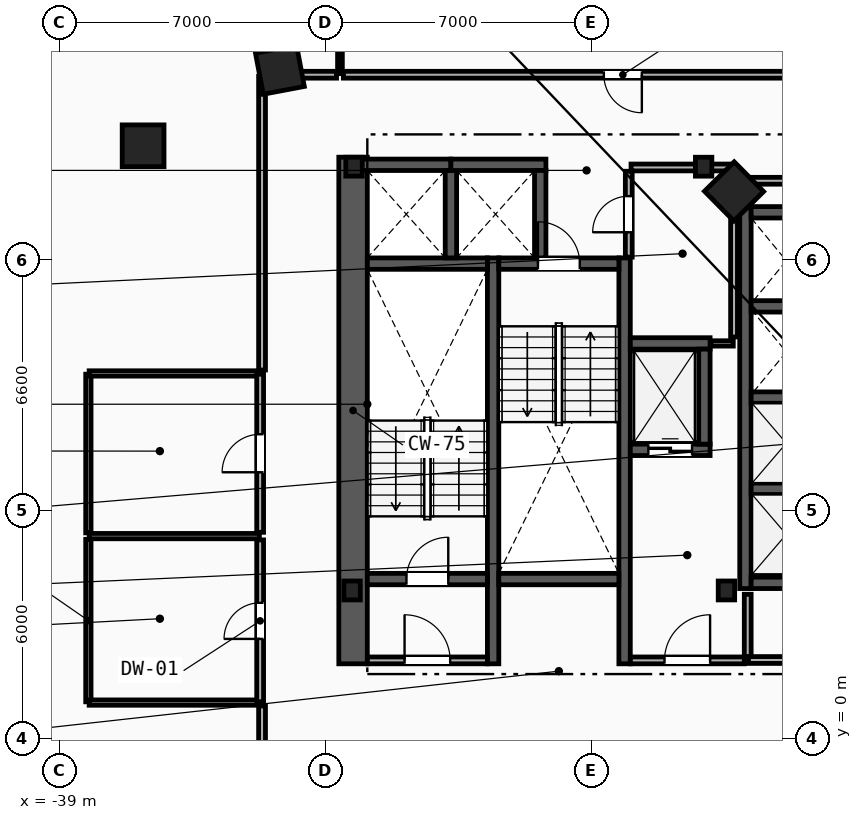
"""IFC4 building model, lengths in metres.
Left out: names, types, materials, properties, quantities, classifications, styles, units other than length and angle.
Written with IfcOpenShell. Run it as: python <this file> out.ifc"""

import sys

from ifc_helpers import new_model, si_unit, direction, frame, frame_2d, origin, origin_2d, place, context, subcontext, project, spatial, rectangle, i_section, extrude, element, fill, save


model = new_model("IFC4")
c1 = context("Model", 3, precision=1e-05, world=origin(), true_north=direction((0.0, 1.0)))
c2 = subcontext(c1, "Body", "Model", "MODEL_VIEW")
j1 = project(units=[si_unit("LENGTHUNIT", "METRE"), si_unit("PLANEANGLEUNIT", "RADIAN")], contexts=[c1])
p1 = place(None, origin())
s1 = spatial("IfcSite", under=j1, at=p1, CompositionType="ELEMENT")
p2 = place(p1, origin())
s2 = spatial("IfcBuilding", under=s1, at=p2, CompositionType="ELEMENT")
p3 = place(p2, frame((0.0, 0.0, 128.6)))
s3 = spatial("IfcBuildingStorey", under=s2, at=p3, CompositionType="ELEMENT", Elevation=128.6)
for number, where, z_axis, x_axis in (
    (1, (-31.3, 3.9, 0.0), (0.0, 0.0, 1.0), (1.0, 0.0, 0.0)),
    (2, (-21.45, 3.9, 0.0), (0.0, 0.0, 1.0), (1.0, 0.0, 0.0)),
    (3, (-22.05, 15.05, 0.0), (0.0, 0.0, 1.0), (1.0, 0.0, 0.0)),
    (4, (-31.25, 15.05, 0.0), (0.0, 0.0, 1.0), (1.0, 0.0, 0.0)),
):
    element("IfcColumn", number, at=place(p3, frame(where, z_axis=z_axis, x_axis=x_axis)), inside=s3, PredefinedType="COLUMN", context=c2, shape_type="SweptSolid", body=[
        extrude(i_section(OverallWidth=0.432, OverallDepth=0.498, WebThickness=0.056, FlangeThickness=0.089, FilletRadius=0.018, at=origin_2d()), origin(), (0.0, 0.0, 1.0), 3.6),
    ])
for number, where, z_axis, x_axis in (
    (5, (-36.8, 15.6, 0.0), (0.0, 0.0, 1.0), (1.0, 0.0, 0.0)),
    (6, (-21.25, 14.4, 0.0), (0.0, 0.0, 1.0), (-0.703, 0.711, 0.0)),
    (7, (-33.2, 17.6, 0.0), (0.0, 0.0, 1.0), (-0.983, -0.186, 0.0)),
):
    element("IfcColumn", number, at=place(p3, frame(where, z_axis=z_axis, x_axis=x_axis)), inside=s3, PredefinedType="COLUMN", context=c2, shape_type="SweptSolid", body=[
        extrude(rectangle(XDim=1.1, YDim=1.1, at=origin_2d()), origin(), (0.0, 0.0, 1.0), 3.6),
    ])
p4 = place(p3, frame((-31.275, 1.97, 0.0), z_axis=(0.0, 0.0, 1.0), x_axis=(0.0, 1.0, 0.0)))
e8 = element("IfcWall", 8, at=p4, inside=s3, PredefinedType="SHEAR", context=c2, shape_type="SweptSolid", body=[
    extrude(rectangle(XDim=13.33, YDim=0.75, at=frame_2d((6.665, 0.0))), origin(), (0.0, 0.0, 1.0), 3.32),
])
for number, where, z_axis, x_axis in (
    (9, (-27.59, 1.97, 0.0), (0.0, 0.0, 1.0), (0.0, 1.0, 0.0)),
    (10, (-24.13, 1.97, 0.0), (0.0, 0.0, 1.0), (0.0, 1.0, 0.0)),
):
    element("IfcWall", number, at=place(p3, frame(where, z_axis=z_axis, x_axis=x_axis)), inside=s3, PredefinedType="SHEAR", context=c2, shape_type="SweptSolid", body=[
        extrude(rectangle(XDim=10.68, YDim=0.3, at=frame_2d((5.34, 0.0))), origin(), (0.0, 0.0, 1.0), 3.32),
    ])
p5 = place(p3, frame((-30.9, 4.2, 0.0), z_axis=(0.0, 0.0, 1.0), x_axis=(1.0, 0.0, 0.0)))
e11 = element("IfcWall", 11, at=p5, inside=s3, PredefinedType="SHEAR", context=c2, shape_type="SweptSolid", body=[
    extrude(rectangle(XDim=3.16, YDim=0.3, at=frame_2d((1.58, 0.0))), origin(), (0.0, 0.0, 1.0), 3.32),
])
p6 = place(p5, frame((1.03, 0.0, 0.0)))
e12 = element("IfcOpeningElement", 12, at=p6, cuts=e11, PredefinedType="OPENING", context=c2, shape_type="SweptSolid", body=[
    extrude(rectangle(XDim=1.1, YDim=2.15, at=frame_2d((0.55, 1.075))), frame((0.0, 0.16, 0.0), z_axis=(0.0, -1.0, 0.0), x_axis=(1.0, 0.0, 0.0)), (0.0, 0.0, 1.0), 0.32),
])
p7 = place(p3, frame((-30.9, 12.5, 0.0), z_axis=(0.0, 0.0, 1.0), x_axis=(1.0, 0.0, 0.0)))
e13 = element("IfcWall", 13, at=p7, inside=s3, PredefinedType="SHEAR", context=c2, shape_type="SweptSolid", body=[
    extrude(rectangle(XDim=3.16, YDim=0.3, at=frame_2d((1.58, 0.0))), origin(), (0.0, 0.0, 1.0), 3.32),
])
p8 = place(p3, frame((-27.44, 12.5, 0.0), z_axis=(0.0, 0.0, 1.0), x_axis=(1.0, 0.0, 0.0)))
e14 = element("IfcWall", 14, at=p8, inside=s3, PredefinedType="SHEAR", context=c2, shape_type="SweptSolid", body=[
    extrude(rectangle(XDim=3.16, YDim=0.3, at=frame_2d((1.58, 0.0))), origin(), (0.0, 0.0, 1.0), 3.32),
])
p9 = place(p8, frame((1.03, 0.0, 0.0)))
e15 = element("IfcOpeningElement", 15, at=p9, cuts=e14, PredefinedType="OPENING", context=c2, shape_type="SweptSolid", body=[
    extrude(rectangle(XDim=1.1, YDim=2.15, at=frame_2d((0.55, 1.075))), frame((0.0, 0.16, 0.0), z_axis=(0.0, -1.0, 0.0), x_axis=(1.0, 0.0, 0.0)), (0.0, 0.0, 1.0), 0.32),
])
p10 = place(p3, frame((-27.44, 4.2, 0.0), z_axis=(0.0, 0.0, 1.0), x_axis=(1.0, 0.0, 0.0)))
e16 = element("IfcWall", 16, at=p10, inside=s3, PredefinedType="SHEAR", context=c2, shape_type="SweptSolid", body=[
    extrude(rectangle(XDim=3.16, YDim=0.3, at=frame_2d((1.58, 0.0))), origin(), (0.0, 0.0, 1.0), 3.32),
])
p11 = place(p3, frame((-20.89, 2.15, 0.0), z_axis=(0.0, 0.0, 1.0), x_axis=(0.0, 1.0, 0.0)))
e17 = element("IfcWall", 17, at=p11, inside=s3, PredefinedType="PARTITIONING", context=c2, shape_type="SweptSolid", body=[
    extrude(rectangle(XDim=1.65, YDim=0.18, at=frame_2d((0.825, 0.0))), origin(), (0.0, 0.0, 1.0), 3.32),
])
p12 = place(p3, frame((-23.98, 2.06, 0.0), z_axis=(0.0, 0.0, 1.0), x_axis=(1.0, 0.0, 0.0)))
e18 = element("IfcWall", 18, at=p12, inside=s3, PredefinedType="PARTITIONING", context=c2, shape_type="SweptSolid", body=[
    extrude(rectangle(XDim=3.0, YDim=0.18, at=frame_2d((1.5, 0.0))), origin(), (0.0, 0.0, 1.0), 3.32),
])
p13 = place(p12, frame((0.9, 0.0, 0.0)))
e19 = element("IfcOpeningElement", 19, at=p13, cuts=e18, PredefinedType="OPENING", context=c2, shape_type="SweptSolid", body=[
    extrude(rectangle(XDim=1.2, YDim=2.15, at=frame_2d((0.6, 1.075))), frame((0.0, 0.1, 0.0), z_axis=(0.0, -1.0, 0.0), x_axis=(1.0, 0.0, 0.0)), (0.0, 0.0, 1.0), 0.2),
])
p14 = place(p3, frame((-30.9, 2.06, 0.0), z_axis=(0.0, 0.0, 1.0), x_axis=(1.0, 0.0, 0.0)))
e20 = element("IfcWall", 20, at=p14, inside=s3, PredefinedType="PARTITIONING", context=c2, shape_type="SweptSolid", body=[
    extrude(rectangle(XDim=3.16, YDim=0.18, at=frame_2d((1.58, 0.0))), origin(), (0.0, 0.0, 1.0), 3.32),
])
p15 = place(p14, frame((0.98, 0.0, 0.0)))
e21 = element("IfcOpeningElement", 21, at=p15, cuts=e20, PredefinedType="OPENING", context=c2, shape_type="SweptSolid", body=[
    extrude(rectangle(XDim=1.2, YDim=2.15, at=frame_2d((0.6, 1.075))), frame((0.0, 0.1, 0.0), z_axis=(0.0, -1.0, 0.0), x_axis=(1.0, 0.0, 0.0)), (0.0, 0.0, 1.0), 0.2),
])
p16 = place(p3, frame((-23.98, 7.6, 0.0), z_axis=(0.0, 0.0, 1.0), x_axis=(1.0, 0.0, 0.0)))
e22 = element("IfcWall", 22, at=p16, inside=s3, PredefinedType="SHEAR", context=c2, shape_type="SweptSolid", body=[
    extrude(rectangle(XDim=2.1, YDim=0.3, at=frame_2d((1.05, 0.0))), origin(), (0.0, 0.0, 1.0), 3.32),
])
p17 = place(p16, frame((0.475, 0.0, 0.0)))
e23 = element("IfcOpeningElement", 23, at=p17, cuts=e22, PredefinedType="OPENING", context=c2, shape_type="SweptSolid", body=[
    extrude(rectangle(XDim=1.15, YDim=2.2, at=frame_2d((0.575, 1.1))), frame((0.0, 0.16, 0.0), z_axis=(0.0, -1.0, 0.0), x_axis=(1.0, 0.0, 0.0)), (0.0, 0.0, 1.0), 0.32),
])
p18 = place(p3, frame((-23.98, 10.4, 0.0), z_axis=(0.0, 0.0, 1.0), x_axis=(1.0, 0.0, 0.0)))
e24 = element("IfcWall", 24, at=p18, inside=s3, PredefinedType="SHEAR", context=c2, shape_type="SweptSolid", body=[
    extrude(rectangle(XDim=2.1, YDim=0.3, at=frame_2d((1.05, 0.0))), origin(), (0.0, 0.0, 1.0), 3.32),
])
for number, where, z_axis, x_axis in (
    (25, (-22.03, 7.75, 0.0), (0.0, 0.0, 1.0), (0.0, 1.0, 0.0)),
    (26, (-31.2, 15.1, 0.0), (0.0, 0.0, 1.0), (1.0, 0.0, 0.0)),
):
    element("IfcWall", number, at=place(p3, frame(where, z_axis=z_axis, x_axis=x_axis)), inside=s3, PredefinedType="SHEAR", context=c2, shape_type="SweptSolid", body=[
        extrude(rectangle(XDim=2.5, YDim=0.3, at=frame_2d((1.25, 0.0))), origin(), (0.0, 0.0, 1.0), 3.32),
    ])
p19 = place(p3, frame((-28.7, 12.65, 0.0), z_axis=(0.0, 0.0, 1.0), x_axis=(0.0, 1.0, 0.0)))
e27 = element("IfcWall", 27, at=p19, inside=s3, PredefinedType="SHEAR", context=c2, shape_type="SweptSolid", body=[
    extrude(rectangle(XDim=2.3, YDim=0.3, at=frame_2d((1.15, 0.0))), origin(), (0.0, 0.0, 1.0), 3.32),
])
p20 = place(p3, frame((-28.7, 15.1, 0.0), z_axis=(0.0, 0.0, 1.0), x_axis=(1.0, 0.0, 0.0)))
e28 = element("IfcWall", 28, at=p20, inside=s3, PredefinedType="SHEAR", context=c2, shape_type="SweptSolid", body=[
    extrude(rectangle(XDim=2.5, YDim=0.3, at=frame_2d((1.25, 0.0))), origin(), (0.0, 0.0, 1.0), 3.32),
])
p21 = place(p3, frame((-26.35, 12.65, 0.0), z_axis=(0.0, 0.0, 1.0), x_axis=(0.0, 1.0, 0.0)))
e29 = element("IfcWall", 29, at=p21, inside=s3, PredefinedType="SHEAR", context=c2, shape_type="SweptSolid", body=[
    extrude(rectangle(XDim=2.3, YDim=0.3, at=frame_2d((1.15, 0.0))), origin(), (0.0, 0.0, 1.0), 3.32),
])
p22 = place(p3, frame((-20.95, 3.95, 0.0), z_axis=(0.0, 0.0, 1.0), x_axis=(0.0, 1.0, 0.0)))
e30 = element("IfcWall", 30, at=p22, inside=s3, PredefinedType="SHEAR", context=c2, shape_type="SweptSolid", body=[
    extrude(rectangle(XDim=10.05, YDim=0.3, at=frame_2d((5.025, 0.0))), origin(), (0.0, 0.0, 1.0), 3.32),
])
for number, where, z_axis, x_axis in (
    (31, (-20.8, 4.1, 0.0), (0.0, 0.0, 1.0), (1.0, 0.0, 0.0)),
    (32, (-20.8, 13.85, 0.0), (0.0, 0.0, 1.0), (1.0, 0.0, 0.0)),
):
    element("IfcWall", number, at=place(p3, frame(where, z_axis=z_axis, x_axis=x_axis)), inside=s3, PredefinedType="SHEAR", context=c2, shape_type="SweptSolid", body=[
        extrude(rectangle(XDim=2.15, YDim=0.3, at=frame_2d((1.075, 0.0))), origin(), (0.0, 0.0, 1.0), 3.32),
    ])
for number, where, z_axis, x_axis in (
    (33, (-20.8, 6.575, 0.0), (0.0, 0.0, 1.0), (1.0, 0.0, 0.0)),
    (34, (-20.8, 8.975, 0.0), (0.0, 0.0, 1.0), (1.0, 0.0, 0.0)),
    (35, (-20.8, 11.375, 0.0), (0.0, 0.0, 1.0), (1.0, 0.0, 0.0)),
):
    element("IfcWall", number, at=place(p3, frame(where, z_axis=z_axis, x_axis=x_axis)), inside=s3, PredefinedType="SHEAR", context=c2, shape_type="SweptSolid", body=[
        extrude(rectangle(XDim=1.85, YDim=0.3, at=frame_2d((0.925, 0.0))), origin(), (0.0, 0.0, 1.0), 3.32),
    ])
p23 = place(p3, frame((-20.87, 2.07, 0.0), z_axis=(0.0, 0.0, 1.0), x_axis=(1.0, 0.0, 0.0)))
e36 = element("IfcWall", 36, at=p23, inside=s3, PredefinedType="PARTITIONING", context=c2, shape_type="SweptSolid", body=[
    extrude(rectangle(XDim=3.83, YDim=0.18, at=frame_2d((1.915, 0.0))), origin(), (0.0, 0.0, 1.0), 3.32),
])
p24 = place(p23, frame((1.44, 0.0, 0.0)))
e37 = element("IfcOpeningElement", 37, at=p24, cuts=e36, PredefinedType="OPENING", context=c2, shape_type="SweptSolid", body=[
    extrude(rectangle(XDim=0.95, YDim=2.1, at=frame_2d((0.475, 1.05))), frame((0.0, 0.1, 0.0), z_axis=(0.0, -1.0, 0.0), x_axis=(1.0, 0.0, 0.0)), (0.0, 0.0, 1.0), 0.2),
])
p25 = place(p3, frame((-21.86, 10.4, 0.0), z_axis=(0.0, 0.0, 1.0), x_axis=(1.0, 0.0, 0.0)))
e38 = element("IfcWall", 38, at=p25, inside=s3, PredefinedType="PARTITIONING", context=c2, shape_type="SweptSolid", body=[
    extrude(rectangle(XDim=0.59, YDim=0.14, at=frame_2d((0.295, 0.0))), origin(), (0.0, 0.0, 1.0), 3.32),
])
p26 = place(p3, frame((-21.25, 10.57, 0.0), z_axis=(0.0, 0.0, 1.0), x_axis=(0.0, 1.0, 0.0)))
e39 = element("IfcWall", 39, at=p26, inside=s3, PredefinedType="PARTITIONING", context=c2, shape_type="SweptSolid", body=[
    extrude(rectangle(XDim=4.36, YDim=0.18, at=frame_2d((2.18, 0.0))), origin(), (0.0, 0.0, 1.0), 3.32),
])
p27 = place(p3, frame((-23.96, 15.03, 0.0), z_axis=(0.0, 0.0, 1.0), x_axis=(1.0, 0.0, 0.0)))
e40 = element("IfcWall", 40, at=p27, inside=s3, PredefinedType="PARTITIONING", context=c2, shape_type="SweptSolid", body=[
    extrude(rectangle(XDim=2.61, YDim=0.18, at=frame_2d((1.305, 0.0))), origin(), (0.0, 0.0, 1.0), 2.393),
])
p28 = place(p3, frame((-24.02, 12.67, 0.0), z_axis=(0.0, 0.0, 1.0), x_axis=(0.0, 1.0, 0.0)))
e41 = element("IfcWall", 41, at=p28, inside=s3, PredefinedType="PARTITIONING", context=c2, shape_type="SweptSolid", body=[
    extrude(rectangle(XDim=2.26, YDim=0.18, at=frame_2d((1.13, 0.0))), origin(), (0.0, 0.0, 1.0), 3.32),
])
p29 = place(p28, frame((0.655, 0.0, 0.0)))
e42 = element("IfcOpeningElement", 42, at=p29, cuts=e41, PredefinedType="OPENING", context=c2, shape_type="SweptSolid", body=[
    extrude(rectangle(XDim=0.95, YDim=2.1, at=frame_2d((0.475, 1.05))), frame((0.0, 0.1, 0.0), z_axis=(0.0, -1.0, 0.0), x_axis=(1.0, 0.0, 0.0)), (0.0, 0.0, 1.0), 0.2),
])
p30 = place(p3, frame((-38.24, 0.97, 0.0), z_axis=(0.0, 0.0, 1.0), x_axis=(0.0, 1.0, 0.0)))
e43 = element("IfcWall", 43, at=p30, inside=s3, PredefinedType="PARTITIONING", context=c2, shape_type="SweptSolid", body=[
    extrude(rectangle(XDim=4.275, YDim=0.14, at=frame_2d((2.138, 0.0))), origin(), (0.0, 0.0, 1.0), 3.32),
])
p31 = place(p3, frame((-38.24, 5.415, 0.0), z_axis=(0.0, 0.0, 1.0), x_axis=(0.0, 1.0, 0.0)))
e44 = element("IfcWall", 44, at=p31, inside=s3, PredefinedType="PARTITIONING", context=c2, shape_type="SweptSolid", body=[
    extrude(rectangle(XDim=4.175, YDim=0.14, at=frame_2d((2.087, 0.0))), origin(), (0.0, 0.0, 1.0), 3.32),
])
for number, where, z_axis, x_axis in (
    (45, (-38.22, 0.95, 0.0), (0.0, 0.0, 1.0), (1.0, 0.0, 0.0)),
    (46, (-38.22, 5.33, 0.0), (0.0, 0.0, 1.0), (1.0, 0.0, 0.0)),
    (47, (-38.22, 9.61, 0.0), (0.0, 0.0, 1.0), (1.0, 0.0, 0.0)),
):
    element("IfcWall", number, at=place(p3, frame(where, z_axis=z_axis, x_axis=x_axis)), inside=s3, PredefinedType="PARTITIONING", context=c2, shape_type="SweptSolid", body=[
        extrude(rectangle(XDim=4.48, YDim=0.14, at=frame_2d((2.24, 0.0))), origin(), (0.0, 0.0, 1.0), 3.32),
    ])
p32 = place(p3, frame((-33.72, 0.97, 0.0), z_axis=(0.0, 0.0, 1.0), x_axis=(0.0, 1.0, 0.0)))
e48 = element("IfcWall", 48, at=p32, inside=s3, PredefinedType="PARTITIONING", context=c2, shape_type="SweptSolid", body=[
    extrude(rectangle(XDim=4.26, YDim=0.18, at=frame_2d((2.13, 0.0))), origin(), (0.0, 0.0, 1.0), 3.32),
])
p33 = place(p32, frame((1.655, 0.0, 0.0)))
e49 = element("IfcOpeningElement", 49, at=p33, cuts=e48, PredefinedType="OPENING", context=c2, shape_type="SweptSolid", body=[
    extrude(rectangle(XDim=0.95, YDim=2.1, at=frame_2d((0.475, 1.05))), frame((0.0, 0.1, 0.0), z_axis=(0.0, -1.0, 0.0), x_axis=(1.0, 0.0, 0.0)), (0.0, 0.0, 1.0), 0.2),
])
p34 = place(p3, frame((-33.72, 5.43, 0.0), z_axis=(0.0, 0.0, 1.0), x_axis=(0.0, 1.0, 0.0)))
e50 = element("IfcWall", 50, at=p34, inside=s3, PredefinedType="PARTITIONING", context=c2, shape_type="SweptSolid", body=[
    extrude(rectangle(XDim=4.16, YDim=0.18, at=frame_2d((2.08, 0.0))), origin(), (0.0, 0.0, 1.0), 3.32),
])
p35 = place(p34, frame((1.58, 0.0, 0.0)))
e51 = element("IfcOpeningElement", 51, at=p35, cuts=e50, PredefinedType="OPENING", context=c2, shape_type="SweptSolid", body=[
    extrude(rectangle(XDim=1.0, YDim=2.15, at=frame_2d((0.5, 1.075))), frame((0.0, 0.1, 0.0), z_axis=(0.0, -1.0, 0.0), x_axis=(1.0, 0.0, 0.0)), (0.0, 0.0, 1.0), 0.2),
])
p36 = place(p3, frame((-31.62, 17.5, 0.0), z_axis=(0.0, 0.0, 1.0), x_axis=(0.0, 1.0, 0.0)))
e52 = element("IfcWall", 52, at=p36, inside=s3, PredefinedType="PARTITIONING", context=c2, shape_type="SweptSolid", body=[
    extrude(rectangle(XDim=8.485, YDim=0.125, at=frame_2d((4.243, 0.0))), origin(), (0.0, 0.0, 1.0), 3.32),
])
p37 = place(p3, frame((-16.822, 17.47, 0.0), z_axis=(0.0, 0.0, 1.0), x_axis=(-1.0, 0.0, 0.0)))
e53 = element("IfcWall", 53, at=p37, inside=s3, PredefinedType="PARTITIONING", context=c2, shape_type="SweptSolid", body=[
    extrude(rectangle(XDim=14.708, YDim=0.18, at=frame_2d((7.354, 0.0))), origin(), (0.0, 0.0, 1.0), 3.32),
])
p38 = place(p37, frame((6.854, 0.0, 0.0)))
e54 = element("IfcOpeningElement", 54, at=p38, cuts=e53, PredefinedType="OPENING", context=c2, shape_type="SweptSolid", body=[
    extrude(rectangle(XDim=1.0, YDim=2.15, at=frame_2d((0.5, 1.075))), frame((0.0, 0.1, 0.0), z_axis=(0.0, -1.0, 0.0), x_axis=(1.0, 0.0, 0.0)), (0.0, 0.0, 1.0), 0.2),
])
p39 = place(p3, frame((-33.67, 0.859, 0.0), z_axis=(0.0, 0.0, 1.0), x_axis=(0.0, -1.0, 0.0)))
e55 = element("IfcWall", 55, at=p39, inside=s3, PredefinedType="PARTITIONING", context=c2, shape_type="SweptSolid", body=[
    extrude(rectangle(XDim=12.259, YDim=0.18, at=frame_2d((6.129, 0.0))), origin(), (0.0, 0.0, 1.0), 3.32),
])
p40 = place(p3, frame((-33.67, 17.428, 0.0), z_axis=(0.0, 0.0, 1.0), x_axis=(0.0, -1.0, 0.0)))
e56 = element("IfcWall", 56, at=p40, inside=s3, PredefinedType="PARTITIONING", context=c2, shape_type="SweptSolid", body=[
    extrude(rectangle(XDim=7.727, YDim=0.18, at=frame_2d((3.864, 0.0))), origin(), (0.0, 0.0, 1.0), 3.32),
])
p41 = place(p3, frame((-21.178, 14.68, 0.0), z_axis=(0.0, 0.0, 1.0), x_axis=(1.0, 0.0, 0.0)))
e57 = element("IfcWall", 57, at=p41, inside=s3, PredefinedType="PARTITIONING", context=c2, shape_type="SweptSolid", body=[
    extrude(rectangle(XDim=4.357, YDim=0.18, at=frame_2d((2.178, 0.0))), origin(), (0.0, 0.0, 1.0), 3.32),
])
p42 = place(p3, frame((-31.71, 17.47, 0.0), z_axis=(0.0, 0.0, 1.0), x_axis=(-1.0, 0.0, 0.0)))
e58 = element("IfcWall", 58, at=p42, inside=s3, PredefinedType="PARTITIONING", context=c2, shape_type="SweptSolid", body=[
    extrude(rectangle(XDim=1.918, YDim=0.18, at=frame_2d((0.959, 0.0))), origin(), (0.0, 0.0, 1.0), 3.32),
])
p43 = place(p6, origin())
e59 = element("IfcDoor", 59, at=p43, inside=s3, OperationType="SINGLE_SWING_RIGHT", PredefinedType="DOOR", context=c2, shape_type="SweptSolid", body=[
    extrude(rectangle(XDim=1.1, YDim=2.15, at=frame_2d((0.55, 1.075))), frame((0.0, 0.025, 0.0), z_axis=(0.0, -1.0, 0.0), x_axis=(1.0, 0.0, 0.0)), (0.0, 0.0, 1.0), 0.05),
])
fill(e12, e59)
p44 = place(p9, origin())
e60 = element("IfcDoor", 60, at=p44, inside=s3, OperationType="SINGLE_SWING_LEFT", PredefinedType="DOOR", context=c2, shape_type="SweptSolid", body=[
    extrude(rectangle(XDim=1.1, YDim=2.15, at=frame_2d((0.55, 1.075))), frame((0.0, 0.025, 0.0), z_axis=(0.0, -1.0, 0.0), x_axis=(1.0, 0.0, 0.0)), (0.0, 0.0, 1.0), 0.05),
])
fill(e15, e60)
p45 = place(p13, origin())
e61 = element("IfcDoor", 61, at=p45, inside=s3, OperationType="SINGLE_SWING_RIGHT", PredefinedType="DOOR", context=c2, shape_type="SweptSolid", body=[
    extrude(rectangle(XDim=1.2, YDim=2.15, at=frame_2d((0.6, 1.075))), frame((0.0, 0.025, 0.0), z_axis=(0.0, -1.0, 0.0), x_axis=(1.0, 0.0, 0.0)), (0.0, 0.0, 1.0), 0.05),
])
fill(e19, e61)
p46 = place(p15, origin())
e62 = element("IfcDoor", 62, at=p46, inside=s3, OperationType="SINGLE_SWING_LEFT", PredefinedType="DOOR", context=c2, shape_type="SweptSolid", body=[
    extrude(rectangle(XDim=1.2, YDim=2.15, at=frame_2d((0.6, 1.075))), frame((0.0, 0.025, 0.0), z_axis=(0.0, -1.0, 0.0), x_axis=(1.0, 0.0, 0.0)), (0.0, 0.0, 1.0), 0.05),
])
fill(e21, e62)
p47 = place(p17, origin())
e63 = element("IfcDoor", 63, at=p47, inside=s3, OperationType="SLIDING_TO_LEFT", PredefinedType="TRAPDOOR", context=c2, shape_type="SweptSolid", body=[
    extrude(rectangle(XDim=1.15, YDim=2.2, at=frame_2d((0.575, 1.1))), frame((0.0, 0.025, 0.0), z_axis=(0.0, -1.0, 0.0), x_axis=(1.0, 0.0, 0.0)), (0.0, 0.0, 1.0), 0.05),
])
fill(e23, e63)
p48 = place(p38, origin())
e64 = element("IfcDoor", 64, at=p48, inside=s3, OperationType="SINGLE_SWING_LEFT", PredefinedType="DOOR", context=c2, shape_type="SweptSolid", body=[
    extrude(rectangle(XDim=1.0, YDim=2.15, at=frame_2d((0.5, 1.075))), frame((0.0, 0.025, 0.0), z_axis=(0.0, -1.0, 0.0), x_axis=(1.0, 0.0, 0.0)), (0.0, 0.0, 1.0), 0.05),
])
fill(e54, e64)
p49 = place(p33, origin())
e65 = element("IfcDoor", 65, at=p49, inside=s3, OperationType="SINGLE_SWING_LEFT", PredefinedType="DOOR", context=c2, shape_type="SweptSolid", body=[
    extrude(rectangle(XDim=0.95, YDim=2.1, at=frame_2d((0.475, 1.05))), frame((0.0, 0.025, 0.0), z_axis=(0.0, -1.0, 0.0), x_axis=(1.0, 0.0, 0.0)), (0.0, 0.0, 1.0), 0.05),
])
fill(e49, e65)
p50 = place(p35, origin())
e66 = element("IfcDoor", 66, at=p50, inside=s3, OperationType="SINGLE_SWING_LEFT", PredefinedType="DOOR", context=c2, shape_type="SweptSolid", body=[
    extrude(rectangle(XDim=1.0, YDim=2.15, at=frame_2d((0.5, 1.075))), frame((0.0, 0.025, 0.0), z_axis=(0.0, -1.0, 0.0), x_axis=(1.0, 0.0, 0.0)), (0.0, 0.0, 1.0), 0.05),
])
fill(e51, e66)
p51 = place(p29, origin())
e67 = element("IfcDoor", 67, at=p51, inside=s3, OperationType="SINGLE_SWING_LEFT", PredefinedType="DOOR", context=c2, shape_type="SweptSolid", body=[
    extrude(rectangle(XDim=0.95, YDim=2.1, at=frame_2d((0.475, 1.05))), frame((0.0, 0.025, 0.0), z_axis=(0.0, -1.0, 0.0), x_axis=(1.0, 0.0, 0.0)), (0.0, 0.0, 1.0), 0.05),
])
fill(e42, e67)
save(model, sys.argv[1])
